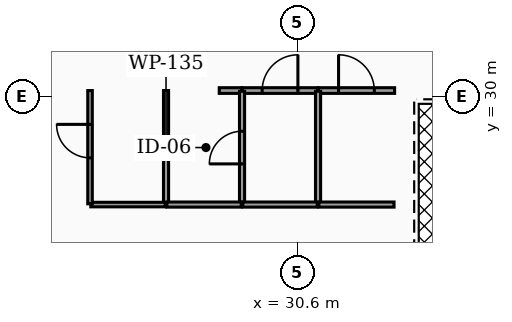
"""IFC4 building model, lengths in metres.
Left out: names, types, materials, properties, quantities, classifications, styles, units other than length and angle.
Written with IfcOpenShell. Run it as: python <this file> out.ifc"""

import sys

from ifc_helpers import new_model, si_unit, direction, frame, frame_2d, origin, place, context, subcontext, project, spatial, rectangle, extrude, element, fill, save


model = new_model("IFC4")
c1 = context("Model", 3, precision=1e-05, world=origin(), true_north=direction((0.0, 1.0)))
c2 = subcontext(c1, "Body", "Model", "MODEL_VIEW")
j1 = project(units=[si_unit("LENGTHUNIT", "METRE"), si_unit("PLANEANGLEUNIT", "RADIAN")], contexts=[c1])
p1 = place(None, origin())
s1 = spatial("IfcSite", under=j1, at=p1, CompositionType="ELEMENT")
p2 = place(p1, origin())
s2 = spatial("IfcBuilding", under=s1, at=p2, CompositionType="ELEMENT")
p3 = place(p2, frame((0.0, 0.0, 142.12)))
s3 = spatial("IfcBuildingStorey", under=s2, at=p3, CompositionType="ELEMENT", Elevation=142.12)
p4 = place(p3, frame((28.55, 30.15, 0.0), z_axis=(0.0, 0.0, 1.0), x_axis=(1.0, 0.0, 0.0)))
e1 = element("IfcWall", 1, at=p4, inside=s3, PredefinedType="PARTITIONING", context=c2, shape_type="SweptSolid", body=[
    extrude(rectangle(XDim=0.595, YDim=0.15, at=frame_2d((0.297, 0.0))), origin(), (0.0, 0.0, 1.0), 2.457),
])
p5 = place(p3, frame((29.155, 30.15, 0.0), z_axis=(0.0, 0.0, 1.0), x_axis=(1.0, 0.0, 0.0)))
e2 = element("IfcWall", 2, at=p5, inside=s3, PredefinedType="PARTITIONING", context=c2, shape_type="SweptSolid", body=[
    extrude(rectangle(XDim=1.99, YDim=0.15, at=frame_2d((0.995, 0.0))), origin(), (0.0, 0.0, 1.0), 2.457),
])
p6 = place(p5, frame((0.525, 0.0, 0.0)))
e3 = element("IfcOpeningElement", 3, at=p6, cuts=e2, PredefinedType="OPENING", context=c2, shape_type="SweptSolid", body=[
    extrude(rectangle(XDim=0.94, YDim=2.05, at=frame_2d((0.47, 1.025))), frame((0.0, 0.085, 0.0), z_axis=(0.0, -1.0, 0.0), x_axis=(1.0, 0.0, 0.0)), (0.0, 0.0, 1.0), 0.17),
])
p7 = place(p3, frame((31.155, 30.15, 0.0), z_axis=(0.0, 0.0, 1.0), x_axis=(1.0, 0.0, 0.0)))
e4 = element("IfcWall", 4, at=p7, inside=s3, PredefinedType="PARTITIONING", context=c2, shape_type="SweptSolid", body=[
    extrude(rectangle(XDim=2.01, YDim=0.15, at=frame_2d((1.005, 0.0))), origin(), (0.0, 0.0, 1.0), 2.457),
])
p8 = place(p7, frame((0.535, 0.0, 0.0)))
e5 = element("IfcOpeningElement", 5, at=p8, cuts=e4, PredefinedType="OPENING", context=c2, shape_type="SweptSolid", body=[
    extrude(rectangle(XDim=0.94, YDim=2.05, at=frame_2d((0.47, 1.025))), frame((0.0, 0.085, 0.0), z_axis=(0.0, -1.0, 0.0), x_axis=(1.0, 0.0, 0.0)), (0.0, 0.0, 1.0), 0.17),
])
p9 = place(p3, frame((27.15, 27.17, 0.0), z_axis=(0.0, 0.0, 1.0), x_axis=(0.0, 1.0, 0.0)))
e6 = element("IfcWall", 6, at=p9, inside=s3, PredefinedType="PARTITIONING", context=c2, shape_type="SweptSolid", body=[
    extrude(rectangle(XDim=2.98, YDim=0.135, at=frame_2d((1.49, 0.0))), origin(), (0.0, 0.0, 1.0), 2.457),
])
p10 = place(p3, frame((25.17, 27.15, 0.0), z_axis=(0.0, 0.0, 1.0), x_axis=(1.0, 0.0, 0.0)))
e7 = element("IfcWall", 7, at=p10, inside=s3, PredefinedType="PARTITIONING", context=c2, shape_type="SweptSolid", body=[
    extrude(rectangle(XDim=1.96, YDim=0.12, at=frame_2d((0.98, 0.0))), origin(), (0.0, 0.0, 1.0), 2.457),
])
p11 = place(p3, frame((25.15, 27.17, 0.0), z_axis=(0.0, 0.0, 1.0), x_axis=(0.0, 1.0, 0.0)))
e8 = element("IfcWall", 8, at=p11, inside=s3, PredefinedType="PARTITIONING", context=c2, shape_type="SweptSolid", body=[
    extrude(rectangle(XDim=2.98, YDim=0.12, at=frame_2d((1.49, 0.0))), origin(), (0.0, 0.0, 1.0), 2.457),
])
p12 = place(p11, frame((1.21, 0.0, 0.0)))
e9 = element("IfcOpeningElement", 9, at=p12, cuts=e8, PredefinedType="OPENING", context=c2, shape_type="SweptSolid", body=[
    extrude(rectangle(XDim=0.88, YDim=2.05, at=frame_2d((0.44, 1.025))), frame((0.0, 0.07, 0.0), z_axis=(0.0, -1.0, 0.0), x_axis=(1.0, 0.0, 0.0)), (0.0, 0.0, 1.0), 0.14),
])
p13 = place(p3, frame((29.15, 27.17, 0.0), z_axis=(0.0, 0.0, 1.0), x_axis=(0.0, 1.0, 0.0)))
e10 = element("IfcWall", 10, at=p13, inside=s3, PredefinedType="PARTITIONING", context=c2, shape_type="SweptSolid", body=[
    extrude(rectangle(XDim=2.96, YDim=0.135, at=frame_2d((1.48, 0.0))), origin(), (0.0, 0.0, 1.0), 2.457),
])
p14 = place(p13, frame((1.05, 0.0, 0.0)))
e11 = element("IfcOpeningElement", 11, at=p14, cuts=e10, PredefinedType="OPENING", context=c2, shape_type="SweptSolid", body=[
    extrude(rectangle(XDim=0.86, YDim=2.05, at=frame_2d((0.43, 1.025))), frame((0.0, 0.077, 0.0), z_axis=(0.0, -1.0, 0.0), x_axis=(1.0, 0.0, 0.0)), (0.0, 0.0, 1.0), 0.155),
])
p15 = place(p3, frame((27.17, 27.15, 0.0), z_axis=(0.0, 0.0, 1.0), x_axis=(1.0, 0.0, 0.0)))
e12 = element("IfcWall", 12, at=p15, inside=s3, PredefinedType="PARTITIONING", context=c2, shape_type="SweptSolid", body=[
    extrude(rectangle(XDim=1.96, YDim=0.135, at=frame_2d((0.98, 0.0))), origin(), (0.0, 0.0, 1.0), 2.457),
])
p16 = place(p3, frame((31.15, 27.17, 0.0), z_axis=(0.0, 0.0, 1.0), x_axis=(0.0, 1.0, 0.0)))
e13 = element("IfcWall", 13, at=p16, inside=s3, PredefinedType="PARTITIONING", context=c2, shape_type="SweptSolid", body=[
    extrude(rectangle(XDim=2.96, YDim=0.135, at=frame_2d((1.48, 0.0))), origin(), (0.0, 0.0, 1.0), 2.457),
])
p17 = place(p3, frame((29.17, 27.15, 0.0), z_axis=(0.0, 0.0, 1.0), x_axis=(1.0, 0.0, 0.0)))
e14 = element("IfcWall", 14, at=p17, inside=s3, PredefinedType="PARTITIONING", context=c2, shape_type="SweptSolid", body=[
    extrude(rectangle(XDim=1.96, YDim=0.135, at=frame_2d((0.98, 0.0))), origin(), (0.0, 0.0, 1.0), 2.457),
])
p18 = place(p3, frame((31.17, 27.15, 0.0), z_axis=(0.0, 0.0, 1.0), x_axis=(1.0, 0.0, 0.0)))
e15 = element("IfcWall", 15, at=p18, inside=s3, PredefinedType="PARTITIONING", context=c2, shape_type="SweptSolid", body=[
    extrude(rectangle(XDim=1.98, YDim=0.135, at=frame_2d((0.99, 0.0))), origin(), (0.0, 0.0, 1.0), 2.457),
])
p19 = place(p6, origin())
e16 = element("IfcDoor", 16, at=p19, inside=s3, OperationType="SINGLE_SWING_RIGHT", PredefinedType="DOOR", context=c2, shape_type="SweptSolid", body=[
    extrude(rectangle(XDim=0.94, YDim=2.05, at=frame_2d((0.47, 1.025))), frame((0.0, 0.025, 0.0), z_axis=(0.0, -1.0, 0.0), x_axis=(1.0, 0.0, 0.0)), (0.0, 0.0, 1.0), 0.05),
])
fill(e3, e16)
p20 = place(p8, origin())
e17 = element("IfcDoor", 17, at=p20, inside=s3, OperationType="SINGLE_SWING_LEFT", PredefinedType="DOOR", context=c2, shape_type="SweptSolid", body=[
    extrude(rectangle(XDim=0.94, YDim=2.05, at=frame_2d((0.47, 1.025))), frame((0.0, 0.025, 0.0), z_axis=(0.0, -1.0, 0.0), x_axis=(1.0, 0.0, 0.0)), (0.0, 0.0, 1.0), 0.05),
])
fill(e5, e17)
p21 = place(p12, origin())
e18 = element("IfcDoor", 18, at=p21, inside=s3, OperationType="SINGLE_SWING_RIGHT", PredefinedType="DOOR", context=c2, shape_type="SweptSolid", body=[
    extrude(rectangle(XDim=0.88, YDim=2.05, at=frame_2d((0.44, 1.025))), frame((0.0, 0.025, 0.0), z_axis=(0.0, -1.0, 0.0), x_axis=(1.0, 0.0, 0.0)), (0.0, 0.0, 1.0), 0.05),
])
fill(e9, e18)
p22 = place(p14, origin())
e19 = element("IfcDoor", 19, at=p22, inside=s3, OperationType="SINGLE_SWING_LEFT", PredefinedType="DOOR", context=c2, shape_type="SweptSolid", body=[
    extrude(rectangle(XDim=0.86, YDim=2.05, at=frame_2d((0.43, 1.025))), frame((0.0, 0.025, 0.0), z_axis=(0.0, -1.0, 0.0), x_axis=(1.0, 0.0, 0.0)), (0.0, 0.0, 1.0), 0.05),
])
fill(e11, e19)
save(model, sys.argv[1])
